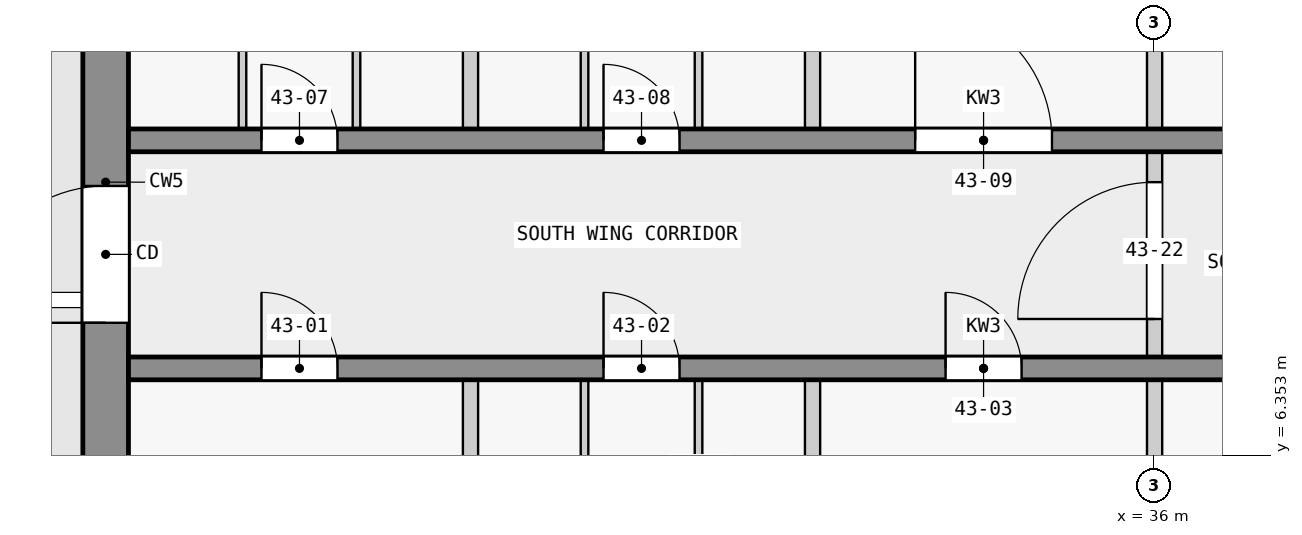
"""IFC4 building model, lengths in metres.
Left out: names, types, materials, properties, quantities, classifications, styles, units other than length and angle.
Written with IfcOpenShell. Run it as: python <this file> out.ifc"""

import sys

from ifc_helpers import new_model, si_unit, direction, frame, frame_2d, origin, place, context, subcontext, project, spatial, rectangle, extrude, element, fill, save


model = new_model("IFC4")
c1 = context("Model", 3, precision=1e-05, world=origin(), true_north=direction((0.0, 1.0)))
c2 = subcontext(c1, "Body", "Model", "MODEL_VIEW")
j1 = project(units=[si_unit("LENGTHUNIT", "METRE"), si_unit("PLANEANGLEUNIT", "RADIAN")], contexts=[c1])
p1 = place(None, origin())
s1 = spatial("IfcSite", under=j1, at=p1, CompositionType="ELEMENT")
p2 = place(p1, origin())
s2 = spatial("IfcBuilding", under=s1, at=p2, CompositionType="ELEMENT")
p3 = place(p2, frame((0.0, 0.0, 167.4)))
s3 = spatial("IfcBuildingStorey", under=s2, at=p3, CompositionType="ELEMENT", Elevation=167.4)
p4 = place(p3, frame((22.2, 2.5, 0.0), z_axis=(0.0, 0.0, 1.0), x_axis=(0.0, 1.0, 0.0)))
e1 = element("IfcWall", 1, at=p4, inside=s3, PredefinedType="SHEAR", context=c2, shape_type="SweptSolid", body=[
    extrude(rectangle(XDim=14.9, YDim=0.6, at=frame_2d((7.45, 0.0))), origin(), (0.0, 0.0, 1.0), 3.25),
])
p5 = place(p4, frame((5.6, 0.0, 0.0)))
e2 = element("IfcOpeningElement", 2, at=p5, cuts=e1, PredefinedType="OPENING", context=c2, shape_type="SweptSolid", body=[
    extrude(rectangle(XDim=1.8, YDim=2.1, at=frame_2d((0.9, 1.05))), frame((0.0, 0.31, 0.0), z_axis=(0.0, -1.0, 0.0), x_axis=(1.0, 0.0, 0.0)), (0.0, 0.0, 1.0), 0.62),
])
p6 = place(p3, frame((22.5, 7.5, 0.0), z_axis=(0.0, 0.0, 1.0), x_axis=(1.0, 0.0, 0.0)))
e3 = element("IfcWall", 3, at=p6, inside=s3, PredefinedType="SHEAR", context=c2, shape_type="SweptSolid", body=[
    extrude(rectangle(XDim=22.5, YDim=0.3, at=frame_2d((11.25, 0.0))), origin(), (0.0, 0.0, 1.0), 3.25),
])
p7 = place(p6, frame((1.75, 0.0, 0.0)))
e4 = element("IfcOpeningElement", 4, at=p7, cuts=e3, PredefinedType="OPENING", context=c2, shape_type="SweptSolid", body=[
    extrude(rectangle(XDim=1.0, YDim=2.1, at=frame_2d((0.5, 1.05))), frame((0.0, 0.16, 0.0), z_axis=(0.0, -1.0, 0.0), x_axis=(1.0, 0.0, 0.0)), (0.0, 0.0, 1.0), 0.32),
])
p8 = place(p6, frame((6.25, 0.0, 0.0)))
e5 = element("IfcOpeningElement", 5, at=p8, cuts=e3, PredefinedType="OPENING", context=c2, shape_type="SweptSolid", body=[
    extrude(rectangle(XDim=1.0, YDim=2.1, at=frame_2d((0.5, 1.05))), frame((0.0, 0.16, 0.0), z_axis=(0.0, -1.0, 0.0), x_axis=(1.0, 0.0, 0.0)), (0.0, 0.0, 1.0), 0.32),
])
p9 = place(p6, frame((10.75, 0.0, 0.0)))
e6 = element("IfcOpeningElement", 6, at=p9, cuts=e3, PredefinedType="OPENING", context=c2, shape_type="SweptSolid", body=[
    extrude(rectangle(XDim=1.0, YDim=2.1, at=frame_2d((0.5, 1.05))), frame((0.0, 0.16, 0.0), z_axis=(0.0, -1.0, 0.0), x_axis=(1.0, 0.0, 0.0)), (0.0, 0.0, 1.0), 0.32),
])
p10 = place(p6, frame((15.25, 0.0, 0.0)))
e7 = element("IfcOpeningElement", 7, at=p10, cuts=e3, PredefinedType="OPENING", context=c2, shape_type="SweptSolid", body=[
    extrude(rectangle(XDim=1.0, YDim=2.1, at=frame_2d((0.5, 1.05))), frame((0.0, 0.16, 0.0), z_axis=(0.0, -1.0, 0.0), x_axis=(1.0, 0.0, 0.0)), (0.0, 0.0, 1.0), 0.32),
])
p11 = place(p6, frame((18.75, 0.0, 0.0)))
e8 = element("IfcOpeningElement", 8, at=p11, cuts=e3, PredefinedType="OPENING", context=c2, shape_type="SweptSolid", body=[
    extrude(rectangle(XDim=0.9, YDim=2.1, at=frame_2d((0.45, 1.05))), frame((0.0, 0.16, 0.0), z_axis=(0.0, -1.0, 0.0), x_axis=(1.0, 0.0, 0.0)), (0.0, 0.0, 1.0), 0.32),
])
p12 = place(p6, frame((20.95, 0.0, 0.0)))
e9 = element("IfcOpeningElement", 9, at=p12, cuts=e3, PredefinedType="OPENING", context=c2, shape_type="SweptSolid", body=[
    extrude(rectangle(XDim=1.0, YDim=2.1, at=frame_2d((0.5, 1.05))), frame((0.0, 0.16, 0.0), z_axis=(0.0, -1.0, 0.0), x_axis=(1.0, 0.0, 0.0)), (0.0, 0.0, 1.0), 0.32),
])
p13 = place(p3, frame((22.5, 10.5, 0.0), z_axis=(0.0, 0.0, 1.0), x_axis=(1.0, 0.0, 0.0)))
e10 = element("IfcWall", 10, at=p13, inside=s3, PredefinedType="SHEAR", context=c2, shape_type="SweptSolid", body=[
    extrude(rectangle(XDim=22.5, YDim=0.3, at=frame_2d((11.25, 0.0))), origin(), (0.0, 0.0, 1.0), 3.25),
])
p14 = place(p13, frame((1.75, 0.0, 0.0)))
e11 = element("IfcOpeningElement", 11, at=p14, cuts=e10, PredefinedType="OPENING", context=c2, shape_type="SweptSolid", body=[
    extrude(rectangle(XDim=1.0, YDim=2.1, at=frame_2d((0.5, 1.05))), frame((0.0, 0.16, 0.0), z_axis=(0.0, -1.0, 0.0), x_axis=(1.0, 0.0, 0.0)), (0.0, 0.0, 1.0), 0.32),
])
p15 = place(p13, frame((6.25, 0.0, 0.0)))
e12 = element("IfcOpeningElement", 12, at=p15, cuts=e10, PredefinedType="OPENING", context=c2, shape_type="SweptSolid", body=[
    extrude(rectangle(XDim=1.0, YDim=2.1, at=frame_2d((0.5, 1.05))), frame((0.0, 0.16, 0.0), z_axis=(0.0, -1.0, 0.0), x_axis=(1.0, 0.0, 0.0)), (0.0, 0.0, 1.0), 0.32),
])
p16 = place(p13, frame((10.35, 0.0, 0.0)))
e13 = element("IfcOpeningElement", 13, at=p16, cuts=e10, PredefinedType="OPENING", context=c2, shape_type="SweptSolid", body=[
    extrude(rectangle(XDim=1.8, YDim=2.1, at=frame_2d((0.9, 1.05))), frame((0.0, 0.16, 0.0), z_axis=(0.0, -1.0, 0.0), x_axis=(1.0, 0.0, 0.0)), (0.0, 0.0, 1.0), 0.32),
])
p17 = place(p13, frame((16.85, 0.0, 0.0)))
e14 = element("IfcOpeningElement", 14, at=p17, cuts=e10, PredefinedType="OPENING", context=c2, shape_type="SweptSolid", body=[
    extrude(rectangle(XDim=1.0, YDim=2.1, at=frame_2d((0.5, 1.05))), frame((0.0, 0.16, 0.0), z_axis=(0.0, -1.0, 0.0), x_axis=(1.0, 0.0, 0.0)), (0.0, 0.0, 1.0), 0.32),
])
p18 = place(p3, frame((24.0, 10.65, 0.0), z_axis=(0.0, 0.0, 1.0), x_axis=(0.0, 1.0, 0.0)))
e15 = element("IfcWall", 15, at=p18, inside=s3, PredefinedType="PARTITIONING", context=c2, shape_type="SweptSolid", body=[
    extrude(rectangle(XDim=3.4, YDim=0.1, at=frame_2d((1.7, 0.0))), origin(), (0.0, 0.0, 1.0), 3.25),
])
p19 = place(p18, frame((1.25, 0.0, 0.0)))
e16 = element("IfcOpeningElement", 16, at=p19, cuts=e15, PredefinedType="OPENING", context=c2, shape_type="SweptSolid", body=[
    extrude(rectangle(XDim=0.9, YDim=2.1, at=frame_2d((0.45, 1.05))), frame((0.0, 0.06, 0.0), z_axis=(0.0, -1.0, 0.0), x_axis=(1.0, 0.0, 0.0)), (0.0, 0.0, 1.0), 0.12),
])
p20 = place(p3, frame((25.5, 14.05, 0.0), z_axis=(0.0, 0.0, 1.0), x_axis=(0.0, -1.0, 0.0)))
e17 = element("IfcWall", 17, at=p20, inside=s3, PredefinedType="PARTITIONING", context=c2, shape_type="SweptSolid", body=[
    extrude(rectangle(XDim=3.4, YDim=0.1, at=frame_2d((1.7, 0.0))), origin(), (0.0, 0.0, 1.0), 3.25),
])
p21 = place(p20, frame((1.25, 0.0, 0.0)))
e18 = element("IfcOpeningElement", 18, at=p21, cuts=e17, PredefinedType="OPENING", context=c2, shape_type="SweptSolid", body=[
    extrude(rectangle(XDim=0.9, YDim=2.1, at=frame_2d((0.45, 1.05))), frame((0.0, 0.06, 0.0), z_axis=(0.0, -1.0, 0.0), x_axis=(1.0, 0.0, 0.0)), (0.0, 0.0, 1.0), 0.12),
])
p22 = place(p3, frame((27.0, 1.527, 0.0), z_axis=(0.0, 0.0, 1.0), x_axis=(0.0, 1.0, 0.0)))
e19 = element("IfcWall", 19, at=p22, inside=s3, PredefinedType="PARTITIONING", context=c2, shape_type="SweptSolid", body=[
    extrude(rectangle(XDim=5.823, YDim=0.2, at=frame_2d((2.912, 0.0))), origin(), (0.0, 0.0, 1.0), 3.25),
])
p23 = place(p3, frame((27.0, 10.65, 0.0), z_axis=(0.0, 0.0, 1.0), x_axis=(0.0, 1.0, 0.0)))
e20 = element("IfcWall", 20, at=p23, inside=s3, PredefinedType="PARTITIONING", context=c2, shape_type="SweptSolid", body=[
    extrude(rectangle(XDim=3.4, YDim=0.2, at=frame_2d((1.7, 0.0))), origin(), (0.0, 0.0, 1.0), 3.25),
])
p24 = place(p3, frame((28.5, 3.95, 0.0), z_axis=(0.0, 0.0, 1.0), x_axis=(0.0, 1.0, 0.0)))
e21 = element("IfcWall", 21, at=p24, inside=s3, PredefinedType="PARTITIONING", context=c2, shape_type="SweptSolid", body=[
    extrude(rectangle(XDim=3.4, YDim=0.1, at=frame_2d((1.7, 0.0))), origin(), (0.0, 0.0, 1.0), 3.25),
])
p25 = place(p24, frame((1.25, 0.0, 0.0)))
e22 = element("IfcOpeningElement", 22, at=p25, cuts=e21, PredefinedType="OPENING", context=c2, shape_type="SweptSolid", body=[
    extrude(rectangle(XDim=0.9, YDim=2.1, at=frame_2d((0.45, 1.05))), frame((0.0, 0.06, 0.0), z_axis=(0.0, -1.0, 0.0), x_axis=(1.0, 0.0, 0.0)), (0.0, 0.0, 1.0), 0.12),
])
p26 = place(p3, frame((28.5, 10.65, 0.0), z_axis=(0.0, 0.0, 1.0), x_axis=(0.0, 1.0, 0.0)))
e23 = element("IfcWall", 23, at=p26, inside=s3, PredefinedType="PARTITIONING", context=c2, shape_type="SweptSolid", body=[
    extrude(rectangle(XDim=3.4, YDim=0.1, at=frame_2d((1.7, 0.0))), origin(), (0.0, 0.0, 1.0), 3.25),
])
p27 = place(p26, frame((1.25, 0.0, 0.0)))
e24 = element("IfcOpeningElement", 24, at=p27, cuts=e23, PredefinedType="OPENING", context=c2, shape_type="SweptSolid", body=[
    extrude(rectangle(XDim=0.9, YDim=2.1, at=frame_2d((0.45, 1.05))), frame((0.0, 0.06, 0.0), z_axis=(0.0, -1.0, 0.0), x_axis=(1.0, 0.0, 0.0)), (0.0, 0.0, 1.0), 0.12),
])
p28 = place(p3, frame((30.0, 7.35, 0.0), z_axis=(0.0, 0.0, 1.0), x_axis=(0.0, -1.0, 0.0)))
e25 = element("IfcWall", 25, at=p28, inside=s3, PredefinedType="PARTITIONING", context=c2, shape_type="SweptSolid", body=[
    extrude(rectangle(XDim=3.4, YDim=0.1, at=frame_2d((1.7, 0.0))), origin(), (0.0, 0.0, 1.0), 3.25),
])
p29 = place(p28, frame((1.25, 0.0, 0.0)))
e26 = element("IfcOpeningElement", 26, at=p29, cuts=e25, PredefinedType="OPENING", context=c2, shape_type="SweptSolid", body=[
    extrude(rectangle(XDim=0.9, YDim=2.1, at=frame_2d((0.45, 1.05))), frame((0.0, 0.06, 0.0), z_axis=(0.0, -1.0, 0.0), x_axis=(1.0, 0.0, 0.0)), (0.0, 0.0, 1.0), 0.12),
])
p30 = place(p3, frame((30.0, 14.05, 0.0), z_axis=(0.0, 0.0, 1.0), x_axis=(0.0, -1.0, 0.0)))
e27 = element("IfcWall", 27, at=p30, inside=s3, PredefinedType="PARTITIONING", context=c2, shape_type="SweptSolid", body=[
    extrude(rectangle(XDim=3.4, YDim=0.1, at=frame_2d((1.7, 0.0))), origin(), (0.0, 0.0, 1.0), 3.25),
])
p31 = place(p30, frame((1.25, 0.0, 0.0)))
e28 = element("IfcOpeningElement", 28, at=p31, cuts=e27, PredefinedType="OPENING", context=c2, shape_type="SweptSolid", body=[
    extrude(rectangle(XDim=0.9, YDim=2.1, at=frame_2d((0.45, 1.05))), frame((0.0, 0.06, 0.0), z_axis=(0.0, -1.0, 0.0), x_axis=(1.0, 0.0, 0.0)), (0.0, 0.0, 1.0), 0.12),
])
for number, where, z_axis, x_axis in (
    (29, (31.5, 3.95, 0.0), (0.0, 0.0, 1.0), (0.0, 1.0, 0.0)),
    (30, (31.5, 10.65, 0.0), (0.0, 0.0, 1.0), (0.0, 1.0, 0.0)),
):
    element("IfcWall", number, at=place(p3, frame(where, z_axis=z_axis, x_axis=x_axis)), inside=s3, PredefinedType="PARTITIONING", context=c2, shape_type="SweptSolid", body=[
        extrude(rectangle(XDim=3.4, YDim=0.2, at=frame_2d((1.7, 0.0))), origin(), (0.0, 0.0, 1.0), 3.25),
    ])
for number, where, z_axis, x_axis in (
    (31, (36.0, 1.4, 0.0), (0.0, 0.0, 1.0), (0.0, 1.0, 0.0)),
    (32, (36.0, 10.65, 0.0), (0.0, 0.0, 1.0), (0.0, 1.0, 0.0)),
):
    element("IfcWall", number, at=place(p3, frame(where, z_axis=z_axis, x_axis=x_axis)), inside=s3, PredefinedType="PARTITIONING", context=c2, shape_type="SweptSolid", body=[
        extrude(rectangle(XDim=5.95, YDim=0.2, at=frame_2d((2.975, 0.0))), origin(), (0.0, 0.0, 1.0), 3.25),
    ])
p32 = place(p3, frame((36.0, 7.45, 0.0), z_axis=(0.0, 0.0, 1.0), x_axis=(0.0, 1.0, 0.0)))
e33 = element("IfcWall", 33, at=p32, inside=s3, PredefinedType="PARTITIONING", context=c2, shape_type="SweptSolid", body=[
    extrude(rectangle(XDim=3.1, YDim=0.2, at=frame_2d((1.55, 0.0))), origin(), (0.0, 0.0, 1.0), 3.25),
])
p33 = place(p32, frame((0.7, 0.0, 0.0)))
e34 = element("IfcOpeningElement", 34, at=p33, cuts=e33, PredefinedType="OPENING", context=c2, shape_type="SweptSolid", body=[
    extrude(rectangle(XDim=1.8, YDim=2.1, at=frame_2d((0.9, 1.05))), frame((0.0, 0.11, 0.0), z_axis=(0.0, -1.0, 0.0), x_axis=(1.0, 0.0, 0.0)), (0.0, 0.0, 1.0), 0.22),
])
p34 = place(p5, origin())
e35 = element("IfcDoor", 35, at=p34, inside=s3, OperationType="DOUBLE_DOOR_SINGLE_SWING", PredefinedType="DOOR", context=c2, shape_type="SweptSolid", body=[
    extrude(rectangle(XDim=1.8, YDim=2.1, at=frame_2d((0.9, 1.05))), frame((0.0, 0.025, 0.0), z_axis=(0.0, -1.0, 0.0), x_axis=(1.0, 0.0, 0.0)), (0.0, 0.0, 1.0), 0.05),
])
fill(e2, e35)
p35 = place(p7, origin())
e36 = element("IfcDoor", 36, at=p35, inside=s3, OperationType="SINGLE_SWING_LEFT", PredefinedType="DOOR", context=c2, shape_type="SweptSolid", body=[
    extrude(rectangle(XDim=1.0, YDim=2.1, at=frame_2d((0.5, 1.05))), frame((0.0, 0.025, 0.0), z_axis=(0.0, -1.0, 0.0), x_axis=(1.0, 0.0, 0.0)), (0.0, 0.0, 1.0), 0.05),
])
fill(e4, e36)
p36 = place(p8, origin())
e37 = element("IfcDoor", 37, at=p36, inside=s3, OperationType="SINGLE_SWING_LEFT", PredefinedType="DOOR", context=c2, shape_type="SweptSolid", body=[
    extrude(rectangle(XDim=1.0, YDim=2.1, at=frame_2d((0.5, 1.05))), frame((0.0, 0.025, 0.0), z_axis=(0.0, -1.0, 0.0), x_axis=(1.0, 0.0, 0.0)), (0.0, 0.0, 1.0), 0.05),
])
fill(e5, e37)
p37 = place(p9, origin())
e38 = element("IfcDoor", 38, at=p37, inside=s3, OperationType="SINGLE_SWING_LEFT", PredefinedType="DOOR", context=c2, shape_type="SweptSolid", body=[
    extrude(rectangle(XDim=1.0, YDim=2.1, at=frame_2d((0.5, 1.05))), frame((0.0, 0.025, 0.0), z_axis=(0.0, -1.0, 0.0), x_axis=(1.0, 0.0, 0.0)), (0.0, 0.0, 1.0), 0.05),
])
fill(e6, e38)
p38 = place(p14, origin())
e39 = element("IfcDoor", 39, at=p38, inside=s3, OperationType="SINGLE_SWING_LEFT", PredefinedType="DOOR", context=c2, shape_type="SweptSolid", body=[
    extrude(rectangle(XDim=1.0, YDim=2.1, at=frame_2d((0.5, 1.05))), frame((0.0, 0.025, 0.0), z_axis=(0.0, -1.0, 0.0), x_axis=(1.0, 0.0, 0.0)), (0.0, 0.0, 1.0), 0.05),
])
fill(e11, e39)
p39 = place(p15, origin())
e40 = element("IfcDoor", 40, at=p39, inside=s3, OperationType="SINGLE_SWING_LEFT", PredefinedType="DOOR", context=c2, shape_type="SweptSolid", body=[
    extrude(rectangle(XDim=1.0, YDim=2.1, at=frame_2d((0.5, 1.05))), frame((0.0, 0.025, 0.0), z_axis=(0.0, -1.0, 0.0), x_axis=(1.0, 0.0, 0.0)), (0.0, 0.0, 1.0), 0.05),
])
fill(e12, e40)
p40 = place(p16, origin())
e41 = element("IfcDoor", 41, at=p40, inside=s3, OperationType="SINGLE_SWING_LEFT", PredefinedType="DOOR", context=c2, shape_type="SweptSolid", body=[
    extrude(rectangle(XDim=1.8, YDim=2.1, at=frame_2d((0.9, 1.05))), frame((0.0, 0.025, 0.0), z_axis=(0.0, -1.0, 0.0), x_axis=(1.0, 0.0, 0.0)), (0.0, 0.0, 1.0), 0.05),
])
fill(e13, e41)
p41 = place(p33, origin())
e42 = element("IfcDoor", 42, at=p41, inside=s3, OperationType="SINGLE_SWING_RIGHT", PredefinedType="DOOR", context=c2, shape_type="SweptSolid", body=[
    extrude(rectangle(XDim=1.8, YDim=2.1, at=frame_2d((0.9, 1.05))), frame((0.0, 0.025, 0.0), z_axis=(0.0, -1.0, 0.0), x_axis=(1.0, 0.0, 0.0)), (0.0, 0.0, 1.0), 0.05),
])
fill(e34, e42)
save(model, sys.argv[1])
